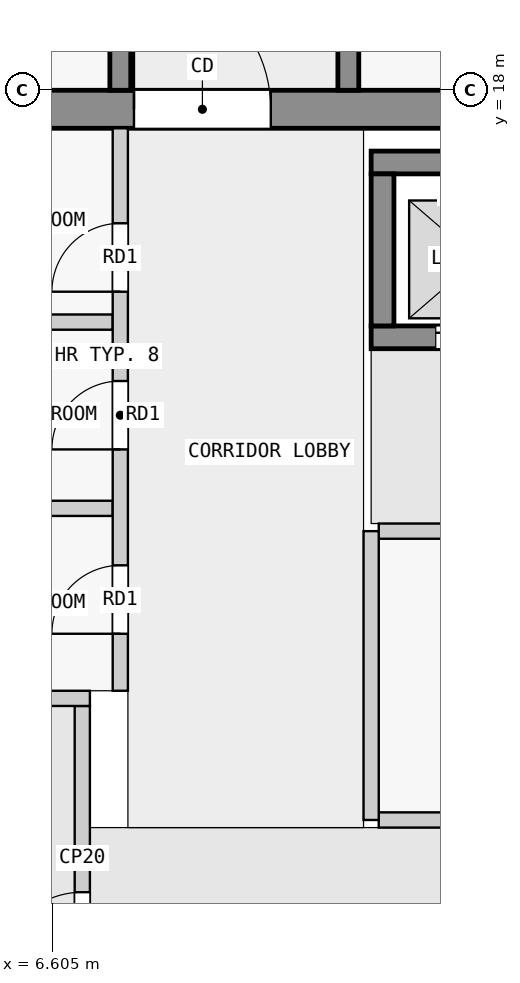
"""IFC4 building model, lengths in metres.
Left out: names, types, materials, properties, quantities, classifications, styles, units other than length and angle.
Written with IfcOpenShell. Run it as: python <this file> out.ifc"""

import sys

from ifc_helpers import new_model, si_unit, direction, frame, frame_2d, origin, place, context, subcontext, project, spatial, rectangle, extrude, element, fill, save


model = new_model("IFC4")
c1 = context("Model", 3, precision=1e-05, world=origin(), true_north=direction((0.0, 1.0)))
c2 = subcontext(c1, "Body", "Model", "MODEL_VIEW")
j1 = project(units=[si_unit("LENGTHUNIT", "METRE"), si_unit("PLANEANGLEUNIT", "RADIAN")], contexts=[c1])
p1 = place(None, origin())
s1 = spatial("IfcSite", under=j1, at=p1, CompositionType="ELEMENT")
p2 = place(p1, origin())
s2 = spatial("IfcBuilding", under=s1, at=p2, CompositionType="ELEMENT")
p3 = place(p2, frame((0.0, 0.0, 218.9)))
s3 = spatial("IfcBuildingStorey", under=s2, at=p3, CompositionType="ELEMENT", Elevation=218.9)
p4 = place(p3, frame((1.38, 17.75, 0.0), z_axis=(0.0, 0.0, 1.0), x_axis=(1.0, 0.0, 0.0)))
e1 = element("IfcWall", 1, at=p4, inside=s3, PredefinedType="SHEAR", context=c2, shape_type="SweptSolid", body=[
    extrude(rectangle(XDim=21.12, YDim=0.5, at=frame_2d((10.56, 0.0))), origin(), (0.0, 0.0, 1.0), 3.25),
])
p5 = place(p4, frame((6.3, 0.0, 0.0)))
e2 = element("IfcOpeningElement", 2, at=p5, cuts=e1, PredefinedType="OPENING", context=c2, shape_type="SweptSolid", body=[
    extrude(rectangle(XDim=1.8, YDim=2.1, at=frame_2d((0.9, 1.05))), frame((0.0, 0.26, 0.0), z_axis=(0.0, -1.0, 0.0), x_axis=(1.0, 0.0, 0.0)), (0.0, 0.0, 1.0), 0.52),
])
p6 = place(p3, frame((10.8, 17.05, 0.0), z_axis=(0.0, 0.0, 1.0), x_axis=(1.0, 0.0, 0.0)))
e3 = element("IfcWall", 3, at=p6, inside=s3, PredefinedType="SHEAR", context=c2, shape_type="SweptSolid", body=[
    extrude(rectangle(XDim=7.8, YDim=0.3, at=frame_2d((3.9, 0.0))), origin(), (0.0, 0.0, 1.0), 3.25),
])
p7 = place(p3, frame((10.8, 14.75, 0.0), z_axis=(0.0, 0.0, 1.0), x_axis=(1.0, 0.0, 0.0)))
e4 = element("IfcWall", 4, at=p7, inside=s3, PredefinedType="SHEAR", context=c2, shape_type="SweptSolid", body=[
    extrude(rectangle(XDim=7.8, YDim=0.3, at=frame_2d((3.9, 0.0))), origin(), (0.0, 0.0, 1.0), 3.25),
])
p8 = place(p7, frame((0.85, 0.0, 0.0)))
e5 = element("IfcOpeningElement", 5, at=p8, cuts=e4, PredefinedType="OPENING", context=c2, shape_type="SweptSolid", body=[
    extrude(rectangle(XDim=1.1, YDim=2.1, at=frame_2d((0.55, 1.05))), frame((0.0, 0.16, 0.0), z_axis=(0.0, -1.0, 0.0), x_axis=(1.0, 0.0, 0.0)), (0.0, 0.0, 1.0), 0.32),
])
p9 = place(p7, frame((3.35, 0.0, 0.0)))
e6 = element("IfcOpeningElement", 6, at=p9, cuts=e4, PredefinedType="OPENING", context=c2, shape_type="SweptSolid", body=[
    extrude(rectangle(XDim=1.1, YDim=2.1, at=frame_2d((0.55, 1.05))), frame((0.0, 0.16, 0.0), z_axis=(0.0, -1.0, 0.0), x_axis=(1.0, 0.0, 0.0)), (0.0, 0.0, 1.0), 0.32),
])
p10 = place(p7, frame((5.85, 0.0, 0.0)))
e7 = element("IfcOpeningElement", 7, at=p10, cuts=e4, PredefinedType="OPENING", context=c2, shape_type="SweptSolid", body=[
    extrude(rectangle(XDim=1.1, YDim=2.1, at=frame_2d((0.55, 1.05))), frame((0.0, 0.16, 0.0), z_axis=(0.0, -1.0, 0.0), x_axis=(1.0, 0.0, 0.0)), (0.0, 0.0, 1.0), 0.32),
])
p11 = place(p3, frame((10.95, 14.9, 0.0), z_axis=(0.0, 0.0, 1.0), x_axis=(0.0, 1.0, 0.0)))
e8 = element("IfcWall", 8, at=p11, inside=s3, PredefinedType="SHEAR", context=c2, shape_type="SweptSolid", body=[
    extrude(rectangle(XDim=2.0, YDim=0.3, at=frame_2d((1.0, 0.0))), origin(), (0.0, 0.0, 1.0), 3.25),
])
p12 = place(p3, frame((7.5, 18.0, 0.0), z_axis=(0.0, 0.0, 1.0), x_axis=(0.0, 1.0, 0.0)))
e9 = element("IfcWall", 9, at=p12, inside=s3, PredefinedType="SHEAR", context=c2, shape_type="SweptSolid", body=[
    extrude(rectangle(XDim=27.0, YDim=0.275, at=frame_2d((13.5, 0.0))), origin(), (0.0, 0.0, 1.0), 3.25),
])
p13 = place(p12, frame((1.75, 0.0, 0.0)))
e10 = element("IfcOpeningElement", 10, at=p13, cuts=e9, PredefinedType="OPENING", context=c2, shape_type="SweptSolid", body=[
    extrude(rectangle(XDim=1.0, YDim=2.1, at=frame_2d((0.5, 1.05))), frame((0.0, 0.147, 0.0), z_axis=(0.0, -1.0, 0.0), x_axis=(1.0, 0.0, 0.0)), (0.0, 0.0, 1.0), 0.295),
])
p14 = place(p12, frame((6.25, 0.0, 0.0)))
e11 = element("IfcOpeningElement", 11, at=p14, cuts=e9, PredefinedType="OPENING", context=c2, shape_type="SweptSolid", body=[
    extrude(rectangle(XDim=1.0, YDim=2.1, at=frame_2d((0.5, 1.05))), frame((0.0, 0.147, 0.0), z_axis=(0.0, -1.0, 0.0), x_axis=(1.0, 0.0, 0.0)), (0.0, 0.0, 1.0), 0.295),
])
p15 = place(p12, frame((10.35, 0.0, 0.0)))
e12 = element("IfcOpeningElement", 12, at=p15, cuts=e9, PredefinedType="OPENING", context=c2, shape_type="SweptSolid", body=[
    extrude(rectangle(XDim=1.8, YDim=2.1, at=frame_2d((0.9, 1.05))), frame((0.0, 0.147, 0.0), z_axis=(0.0, -1.0, 0.0), x_axis=(1.0, 0.0, 0.0)), (0.0, 0.0, 1.0), 0.295),
])
p16 = place(p12, frame((15.25, 0.0, 0.0)))
e13 = element("IfcOpeningElement", 13, at=p16, cuts=e9, PredefinedType="OPENING", context=c2, shape_type="SweptSolid", body=[
    extrude(rectangle(XDim=1.0, YDim=2.1, at=frame_2d((0.5, 1.05))), frame((0.0, 0.147, 0.0), z_axis=(0.0, -1.0, 0.0), x_axis=(1.0, 0.0, 0.0)), (0.0, 0.0, 1.0), 0.295),
])
p17 = place(p12, frame((19.75, 0.0, 0.0)))
e14 = element("IfcOpeningElement", 14, at=p17, cuts=e9, PredefinedType="OPENING", context=c2, shape_type="SweptSolid", body=[
    extrude(rectangle(XDim=1.0, YDim=2.1, at=frame_2d((0.5, 1.05))), frame((0.0, 0.147, 0.0), z_axis=(0.0, -1.0, 0.0), x_axis=(1.0, 0.0, 0.0)), (0.0, 0.0, 1.0), 0.295),
])
p18 = place(p12, frame((23.25, 0.0, 0.0)))
e15 = element("IfcOpeningElement", 15, at=p18, cuts=e9, PredefinedType="OPENING", context=c2, shape_type="SweptSolid", body=[
    extrude(rectangle(XDim=0.9, YDim=2.1, at=frame_2d((0.45, 1.05))), frame((0.0, 0.147, 0.0), z_axis=(0.0, -1.0, 0.0), x_axis=(1.0, 0.0, 0.0)), (0.0, 0.0, 1.0), 0.295),
])
p19 = place(p12, frame((25.45, 0.0, 0.0)))
e16 = element("IfcOpeningElement", 16, at=p19, cuts=e9, PredefinedType="OPENING", context=c2, shape_type="SweptSolid", body=[
    extrude(rectangle(XDim=1.0, YDim=2.1, at=frame_2d((0.5, 1.05))), frame((0.0, 0.147, 0.0), z_axis=(0.0, -1.0, 0.0), x_axis=(1.0, 0.0, 0.0)), (0.0, 0.0, 1.0), 0.295),
])
p20 = place(p3, frame((10.5, 18.0, 0.0), z_axis=(0.0, 0.0, 1.0), x_axis=(0.0, 1.0, 0.0)))
e17 = element("IfcWall", 17, at=p20, inside=s3, PredefinedType="SHEAR", context=c2, shape_type="SweptSolid", body=[
    extrude(rectangle(XDim=27.0, YDim=0.275, at=frame_2d((13.5, 0.0))), origin(), (0.0, 0.0, 1.0), 3.25),
])
p21 = place(p20, frame((1.75, 0.0, 0.0)))
e18 = element("IfcOpeningElement", 18, at=p21, cuts=e17, PredefinedType="OPENING", context=c2, shape_type="SweptSolid", body=[
    extrude(rectangle(XDim=1.0, YDim=2.1, at=frame_2d((0.5, 1.05))), frame((0.0, 0.147, 0.0), z_axis=(0.0, -1.0, 0.0), x_axis=(1.0, 0.0, 0.0)), (0.0, 0.0, 1.0), 0.295),
])
p22 = place(p20, frame((6.25, 0.0, 0.0)))
e19 = element("IfcOpeningElement", 19, at=p22, cuts=e17, PredefinedType="OPENING", context=c2, shape_type="SweptSolid", body=[
    extrude(rectangle(XDim=1.0, YDim=2.1, at=frame_2d((0.5, 1.05))), frame((0.0, 0.147, 0.0), z_axis=(0.0, -1.0, 0.0), x_axis=(1.0, 0.0, 0.0)), (0.0, 0.0, 1.0), 0.295),
])
p23 = place(p20, frame((10.75, 0.0, 0.0)))
e20 = element("IfcOpeningElement", 20, at=p23, cuts=e17, PredefinedType="OPENING", context=c2, shape_type="SweptSolid", body=[
    extrude(rectangle(XDim=1.0, YDim=2.1, at=frame_2d((0.5, 1.05))), frame((0.0, 0.147, 0.0), z_axis=(0.0, -1.0, 0.0), x_axis=(1.0, 0.0, 0.0)), (0.0, 0.0, 1.0), 0.295),
])
p24 = place(p20, frame((15.25, 0.0, 0.0)))
e21 = element("IfcOpeningElement", 21, at=p24, cuts=e17, PredefinedType="OPENING", context=c2, shape_type="SweptSolid", body=[
    extrude(rectangle(XDim=1.0, YDim=2.1, at=frame_2d((0.5, 1.05))), frame((0.0, 0.147, 0.0), z_axis=(0.0, -1.0, 0.0), x_axis=(1.0, 0.0, 0.0)), (0.0, 0.0, 1.0), 0.295),
])
p25 = place(p20, frame((21.35, 0.0, 0.0)))
e22 = element("IfcOpeningElement", 22, at=p25, cuts=e17, PredefinedType="OPENING", context=c2, shape_type="SweptSolid", body=[
    extrude(rectangle(XDim=1.0, YDim=2.1, at=frame_2d((0.5, 1.05))), frame((0.0, 0.147, 0.0), z_axis=(0.0, -1.0, 0.0), x_axis=(1.0, 0.0, 0.0)), (0.0, 0.0, 1.0), 0.295),
])
p26 = place(p3, frame((7.0, 5.9, 0.0), z_axis=(0.0, 0.0, 1.0), x_axis=(0.0, 1.0, 0.0)))
e23 = element("IfcWall", 23, at=p26, inside=s3, PredefinedType="PARTITIONING", context=c2, shape_type="SweptSolid", body=[
    extrude(rectangle(XDim=4.0, YDim=0.2, at=frame_2d((2.0, 0.0))), origin(), (0.0, 0.0, 1.0), 3.25),
])
p27 = place(p26, frame((0.45, 0.0, 0.0)))
e24 = element("IfcOpeningElement", 24, at=p27, cuts=e23, PredefinedType="OPENING", context=c2, shape_type="SweptSolid", body=[
    extrude(rectangle(XDim=1.1, YDim=2.1, at=frame_2d((0.55, 1.05))), frame((0.0, 0.11, 0.0), z_axis=(0.0, -1.0, 0.0), x_axis=(1.0, 0.0, 0.0)), (0.0, 0.0, 1.0), 0.22),
])
p28 = place(p3, frame((5.15, 10.0, 0.0), z_axis=(0.0, 0.0, 1.0), x_axis=(1.0, 0.0, 0.0)))
e25 = element("IfcWall", 25, at=p28, inside=s3, PredefinedType="PARTITIONING", context=c2, shape_type="SweptSolid", body=[
    extrude(rectangle(XDim=1.95, YDim=0.2, at=frame_2d((0.975, 0.0))), origin(), (0.0, 0.0, 1.0), 3.25),
])
p29 = place(p3, frame((10.8, 8.4, 0.0), z_axis=(0.0, 0.0, 1.0), x_axis=(0.0, 1.0, 0.0)))
e26 = element("IfcWall", 26, at=p29, inside=s3, PredefinedType="PARTITIONING", context=c2, shape_type="SweptSolid", body=[
    extrude(rectangle(XDim=3.8, YDim=0.2, at=frame_2d((1.9, 0.0))), origin(), (0.0, 0.0, 1.0), 3.25),
])
p30 = place(p3, frame((10.9, 8.4, 0.0), z_axis=(0.0, 0.0, 1.0), x_axis=(1.0, 0.0, 0.0)))
e27 = element("IfcWall", 27, at=p30, inside=s3, PredefinedType="PARTITIONING", context=c2, shape_type="SweptSolid", body=[
    extrude(rectangle(XDim=6.2, YDim=0.2, at=frame_2d((3.1, 0.0))), origin(), (0.0, 0.0, 1.0), 3.25),
])
p31 = place(p3, frame((10.9, 12.2, 0.0), z_axis=(0.0, 0.0, 1.0), x_axis=(1.0, 0.0, 0.0)))
e28 = element("IfcWall", 28, at=p31, inside=s3, PredefinedType="PARTITIONING", context=c2, shape_type="SweptSolid", body=[
    extrude(rectangle(XDim=6.2, YDim=0.2, at=frame_2d((3.1, 0.0))), origin(), (0.0, 0.0, 1.0), 3.25),
])
p32 = place(p31, frame((2.65, 0.0, 0.0)))
e29 = element("IfcOpeningElement", 29, at=p32, cuts=e28, PredefinedType="OPENING", context=c2, shape_type="SweptSolid", body=[
    extrude(rectangle(XDim=0.9, YDim=2.1, at=frame_2d((0.45, 1.05))), frame((0.0, 0.11, 0.0), z_axis=(0.0, -1.0, 0.0), x_axis=(1.0, 0.0, 0.0)), (0.0, 0.0, 1.0), 0.22),
])
p33 = place(p3, frame((7.5, 10.1, 0.0), z_axis=(0.0, 0.0, 1.0), x_axis=(0.0, 1.0, 0.0)))
e30 = element("IfcWall", 30, at=p33, inside=s3, PredefinedType="PARTITIONING", context=c2, shape_type="SweptSolid", body=[
    extrude(rectangle(XDim=7.4, YDim=0.2, at=frame_2d((3.7, 0.0))), origin(), (0.0, 0.0, 1.0), 3.25),
])
p34 = place(p33, frame((0.75, 0.0, 0.0)))
e31 = element("IfcOpeningElement", 31, at=p34, cuts=e30, PredefinedType="OPENING", context=c2, shape_type="SweptSolid", body=[
    extrude(rectangle(XDim=0.9, YDim=2.1, at=frame_2d((0.45, 1.05))), frame((0.0, 0.11, 0.0), z_axis=(0.0, -1.0, 0.0), x_axis=(1.0, 0.0, 0.0)), (0.0, 0.0, 1.0), 0.22),
])
p35 = place(p33, frame((3.175, 0.0, 0.0)))
e32 = element("IfcOpeningElement", 32, at=p35, cuts=e30, PredefinedType="OPENING", context=c2, shape_type="SweptSolid", body=[
    extrude(rectangle(XDim=0.9, YDim=2.1, at=frame_2d((0.45, 1.05))), frame((0.0, 0.11, 0.0), z_axis=(0.0, -1.0, 0.0), x_axis=(1.0, 0.0, 0.0)), (0.0, 0.0, 1.0), 0.22),
])
p36 = place(p33, frame((5.25, 0.0, 0.0)))
e33 = element("IfcOpeningElement", 33, at=p36, cuts=e30, PredefinedType="OPENING", context=c2, shape_type="SweptSolid", body=[
    extrude(rectangle(XDim=0.9, YDim=2.1, at=frame_2d((0.45, 1.05))), frame((0.0, 0.11, 0.0), z_axis=(0.0, -1.0, 0.0), x_axis=(1.0, 0.0, 0.0)), (0.0, 0.0, 1.0), 0.22),
])
for number, where, z_axis, x_axis in (
    (34, (5.15, 12.5, 0.0), (0.0, 0.0, 1.0), (1.0, 0.0, 0.0)),
    (35, (5.15, 14.95, 0.0), (0.0, 0.0, 1.0), (1.0, 0.0, 0.0)),
):
    element("IfcWall", number, at=place(p3, frame(where, z_axis=z_axis, x_axis=x_axis)), inside=s3, PredefinedType="PARTITIONING", context=c2, shape_type="SweptSolid", body=[
        extrude(rectangle(XDim=2.25, YDim=0.2, at=frame_2d((1.125, 0.0))), origin(), (0.0, 0.0, 1.0), 3.25),
    ])
p37 = place(p27, origin())
e36 = element("IfcDoor", 36, at=p37, inside=s3, OperationType="SINGLE_SWING_LEFT", PredefinedType="DOOR", context=c2, shape_type="SweptSolid", body=[
    extrude(rectangle(XDim=1.1, YDim=2.1, at=frame_2d((0.55, 1.05))), frame((0.0, 0.025, 0.0), z_axis=(0.0, -1.0, 0.0), x_axis=(1.0, 0.0, 0.0)), (0.0, 0.0, 1.0), 0.05),
])
fill(e24, e36)
p38 = place(p8, origin())
e37 = element("IfcDoor", 37, at=p38, inside=s3, OperationType="DOUBLE_DOOR_SLIDING", PredefinedType="DOOR", context=c2, shape_type="SweptSolid", body=[
    extrude(rectangle(XDim=1.1, YDim=2.1, at=frame_2d((0.55, 1.05))), frame((0.0, 0.025, 0.0), z_axis=(0.0, -1.0, 0.0), x_axis=(1.0, 0.0, 0.0)), (0.0, 0.0, 1.0), 0.05),
])
fill(e5, e37)
p39 = place(p5, origin())
e38 = element("IfcDoor", 38, at=p39, inside=s3, OperationType="DOUBLE_DOOR_SINGLE_SWING", PredefinedType="DOOR", context=c2, shape_type="SweptSolid", body=[
    extrude(rectangle(XDim=1.8, YDim=2.1, at=frame_2d((0.9, 1.05))), frame((0.0, 0.025, 0.0), z_axis=(0.0, -1.0, 0.0), x_axis=(1.0, 0.0, 0.0)), (0.0, 0.0, 1.0), 0.05),
])
fill(e2, e38)
p40 = place(p34, origin())
e39 = element("IfcDoor", 39, at=p40, inside=s3, OperationType="SINGLE_SWING_RIGHT", PredefinedType="DOOR", context=c2, shape_type="SweptSolid", body=[
    extrude(rectangle(XDim=0.9, YDim=2.1, at=frame_2d((0.45, 1.05))), frame((0.0, 0.025, 0.0), z_axis=(0.0, -1.0, 0.0), x_axis=(1.0, 0.0, 0.0)), (0.0, 0.0, 1.0), 0.05),
])
fill(e31, e39)
p41 = place(p35, origin())
e40 = element("IfcDoor", 40, at=p41, inside=s3, OperationType="SINGLE_SWING_RIGHT", PredefinedType="DOOR", context=c2, shape_type="SweptSolid", body=[
    extrude(rectangle(XDim=0.9, YDim=2.1, at=frame_2d((0.45, 1.05))), frame((0.0, 0.025, 0.0), z_axis=(0.0, -1.0, 0.0), x_axis=(1.0, 0.0, 0.0)), (0.0, 0.0, 1.0), 0.05),
])
fill(e32, e40)
p42 = place(p36, origin())
e41 = element("IfcDoor", 41, at=p42, inside=s3, OperationType="SINGLE_SWING_RIGHT", PredefinedType="DOOR", context=c2, shape_type="SweptSolid", body=[
    extrude(rectangle(XDim=0.9, YDim=2.1, at=frame_2d((0.45, 1.05))), frame((0.0, 0.025, 0.0), z_axis=(0.0, -1.0, 0.0), x_axis=(1.0, 0.0, 0.0)), (0.0, 0.0, 1.0), 0.05),
])
fill(e33, e41)
save(model, sys.argv[1])
